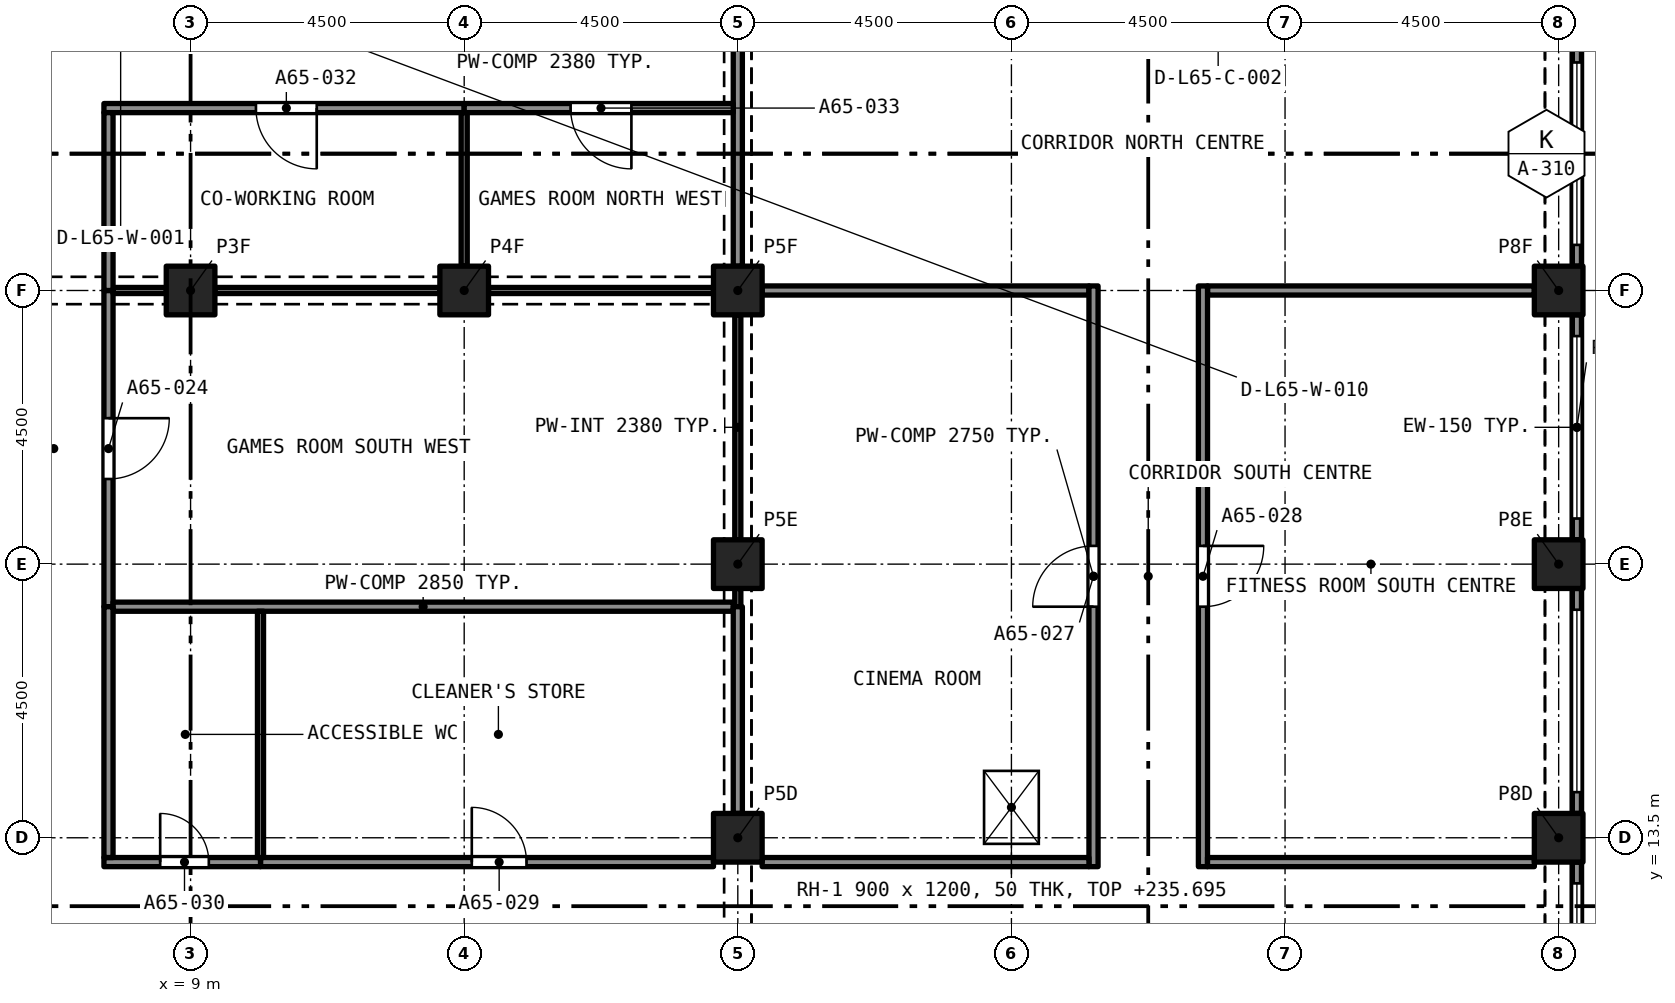
"""IFC4 building model, lengths in metres.
Left out: names, types, materials, properties, quantities, classifications, styles, units other than length and angle.
Written with IfcOpenShell. Run it as: python <this file> out.ifc"""

import sys

from ifc_helpers import new_model, si_unit, direction, frame, frame_2d, origin, origin_2d, place, context, subcontext, project, spatial, rectangle, extrude, element, fill, save


model = new_model("IFC4")
c1 = context("Model", 3, precision=1e-05, world=origin(), true_north=direction((0.0, 1.0)))
c2 = subcontext(c1, "Body", "Model", "MODEL_VIEW")
j1 = project(units=[si_unit("LENGTHUNIT", "METRE"), si_unit("PLANEANGLEUNIT", "RADIAN")], contexts=[c1])
p1 = place(None, origin())
s1 = spatial("IfcSite", under=j1, at=p1, CompositionType="ELEMENT")
p2 = place(p1, origin())
s2 = spatial("IfcBuilding", under=s1, at=p2, CompositionType="ELEMENT")
p3 = place(p2, frame((0.0, 0.0, 232.495)))
s3 = spatial("IfcBuildingStorey", under=s2, at=p3, CompositionType="ELEMENT", Elevation=232.495)
for number, where, z_axis, x_axis in (
    (1, (18.0, 13.5, 0.0), (0.0, 0.0, 1.0), (1.0, 0.0, 0.0)),
    (2, (31.5, 13.5, 0.0), (0.0, 0.0, 1.0), (1.0, 0.0, 0.0)),
    (3, (18.0, 18.0, 0.0), (0.0, 0.0, 1.0), (1.0, 0.0, 0.0)),
    (4, (31.5, 18.0, 0.0), (0.0, 0.0, 1.0), (1.0, 0.0, 0.0)),
    (5, (9.0, 22.5, 0.0), (0.0, 0.0, 1.0), (1.0, 0.0, 0.0)),
    (6, (13.5, 22.5, 0.0), (0.0, 0.0, 1.0), (1.0, 0.0, 0.0)),
    (7, (18.0, 22.5, 0.0), (0.0, 0.0, 1.0), (1.0, 0.0, 0.0)),
    (8, (31.5, 22.5, 0.0), (0.0, 0.0, 1.0), (1.0, 0.0, 0.0)),
):
    element("IfcColumn", number, at=place(p3, frame(where, z_axis=z_axis, x_axis=x_axis)), inside=s3, PredefinedType="COLUMN", context=c2, shape_type="SweptSolid", body=[
        extrude(rectangle(XDim=0.8, YDim=0.8, at=origin_2d()), origin(), (0.0, 0.0, 1.0), 3.2),
    ])
p4 = place(p3, frame((31.8, 13.1, 0.0), z_axis=(0.0, 0.0, 1.0), x_axis=(0.0, -1.0, 0.0)))
e9 = element("IfcWall", 9, at=p4, inside=s3, PredefinedType="SOLIDWALL", context=c2, shape_type="SweptSolid", body=[
    extrude(rectangle(XDim=3.7, YDim=0.15, at=frame_2d((1.85, 0.0))), origin(), (0.0, 0.0, 1.0), 3.2),
])
p5 = place(p4, frame((0.35, 0.0, 0.45)))
e10 = element("IfcOpeningElement", 10, at=p5, cuts=e9, PredefinedType="OPENING", context=c2, shape_type="SweptSolid", body=[
    extrude(rectangle(XDim=3.0, YDim=1.95, at=frame_2d((1.5, 0.975))), frame((0.0, 0.085, 0.0), z_axis=(0.0, -1.0, 0.0), x_axis=(1.0, 0.0, 0.0)), (0.0, 0.0, 1.0), 0.17),
])
p6 = place(p3, frame((31.8, 17.6, 0.0), z_axis=(0.0, 0.0, 1.0), x_axis=(0.0, -1.0, 0.0)))
e11 = element("IfcWall", 11, at=p6, inside=s3, PredefinedType="SOLIDWALL", context=c2, shape_type="SweptSolid", body=[
    extrude(rectangle(XDim=3.7, YDim=0.15, at=frame_2d((1.85, 0.0))), origin(), (0.0, 0.0, 1.0), 3.2),
])
p7 = place(p6, frame((0.35, 0.0, 0.45)))
e12 = element("IfcOpeningElement", 12, at=p7, cuts=e11, PredefinedType="OPENING", context=c2, shape_type="SweptSolid", body=[
    extrude(rectangle(XDim=3.0, YDim=1.95, at=frame_2d((1.5, 0.975))), frame((0.0, 0.085, 0.0), z_axis=(0.0, -1.0, 0.0), x_axis=(1.0, 0.0, 0.0)), (0.0, 0.0, 1.0), 0.17),
])
p8 = place(p3, frame((31.8, 22.1, 0.0), z_axis=(0.0, 0.0, 1.0), x_axis=(0.0, -1.0, 0.0)))
e13 = element("IfcWall", 13, at=p8, inside=s3, PredefinedType="SOLIDWALL", context=c2, shape_type="SweptSolid", body=[
    extrude(rectangle(XDim=3.7, YDim=0.15, at=frame_2d((1.85, 0.0))), origin(), (0.0, 0.0, 1.0), 3.2),
])
p9 = place(p8, frame((0.35, 0.0, 0.45)))
e14 = element("IfcOpeningElement", 14, at=p9, cuts=e13, PredefinedType="OPENING", context=c2, shape_type="SweptSolid", body=[
    extrude(rectangle(XDim=3.0, YDim=1.95, at=frame_2d((1.5, 0.975))), frame((0.0, 0.085, 0.0), z_axis=(0.0, -1.0, 0.0), x_axis=(1.0, 0.0, 0.0)), (0.0, 0.0, 1.0), 0.17),
])
p10 = place(p3, frame((31.8, 26.6, 0.0), z_axis=(0.0, 0.0, 1.0), x_axis=(0.0, -1.0, 0.0)))
e15 = element("IfcWall", 15, at=p10, inside=s3, PredefinedType="SOLIDWALL", context=c2, shape_type="SweptSolid", body=[
    extrude(rectangle(XDim=3.7, YDim=0.15, at=frame_2d((1.85, 0.0))), origin(), (0.0, 0.0, 1.0), 3.2),
])
p11 = place(p10, frame((0.35, 0.0, 0.45)))
e16 = element("IfcOpeningElement", 16, at=p11, cuts=e15, PredefinedType="OPENING", context=c2, shape_type="SweptSolid", body=[
    extrude(rectangle(XDim=3.0, YDim=1.95, at=frame_2d((1.5, 0.975))), frame((0.0, 0.085, 0.0), z_axis=(0.0, -1.0, 0.0), x_axis=(1.0, 0.0, 0.0)), (0.0, 0.0, 1.0), 0.17),
])
for number, where, z_axis, x_axis in (
    (17, (31.8, 13.1, 3.2), (0.0, 0.0, 1.0), (0.0, -1.0, 0.0)),
    (18, (31.8, 17.6, 3.2), (0.0, 0.0, 1.0), (0.0, -1.0, 0.0)),
    (19, (31.8, 22.1, 3.2), (0.0, 0.0, 1.0), (0.0, -1.0, 0.0)),
    (20, (31.8, 26.6, 3.2), (0.0, 0.0, 1.0), (0.0, -1.0, 0.0)),
):
    element("IfcWall", number, at=place(p3, frame(where, z_axis=z_axis, x_axis=x_axis)), inside=s3, PredefinedType="PARAPET", context=c2, shape_type="SweptSolid", body=[
        extrude(rectangle(XDim=3.7, YDim=0.15, at=frame_2d((1.85, 0.0))), origin(), (0.0, 0.0, 1.0), 1.1),
    ])
p12 = place(p3, frame((18.0, 18.4, 0.0), z_axis=(0.0, 0.0, 1.0), x_axis=(0.0, 1.0, 0.0)))
e21 = element("IfcWall", 21, at=p12, inside=s3, PredefinedType="PARTITIONING", context=c2, shape_type="SweptSolid", body=[
    extrude(rectangle(XDim=3.7, YDim=0.1, at=frame_2d((1.85, 0.0))), origin(), (0.0, 0.0, 1.0), 2.38),
])
p13 = place(p3, frame((18.0, 17.3, 0.0), z_axis=(0.0, 0.0, 1.0), x_axis=(0.0, 1.0, 0.0)))
e22 = element("IfcWall", 22, at=p13, inside=s3, PredefinedType="PARTITIONING", context=c2, shape_type="SweptSolid", body=[
    extrude(rectangle(XDim=0.3, YDim=0.1, at=frame_2d((0.15, 0.0))), origin(), (0.0, 0.0, 1.0), 2.75),
])
p14 = place(p3, frame((7.65, 22.5, 0.0), z_axis=(0.0, 0.0, 1.0), x_axis=(0.0, -1.0, 0.0)))
e23 = element("IfcWall", 23, at=p14, inside=s3, PredefinedType="PARTITIONING", context=c2, shape_type="SweptSolid", body=[
    extrude(rectangle(XDim=5.2, YDim=0.15, at=frame_2d((2.6, 0.0))), origin(), (0.0, 0.0, 1.0), 2.85),
])
p15 = place(p14, frame((2.1, 0.0, 0.0)))
e24 = element("IfcOpeningElement", 24, at=p15, cuts=e23, PredefinedType="OPENING", context=c2, shape_type="SweptSolid", body=[
    extrude(rectangle(XDim=1.0, YDim=2.1, at=frame_2d((0.5, 1.05))), frame((0.0, 0.085, 0.0), z_axis=(0.0, -1.0, 0.0), x_axis=(1.0, 0.0, 0.0)), (0.0, 0.0, 1.0), 0.17),
])
p16 = place(p3, frame((7.725, 22.5, 0.0), z_axis=(0.0, 0.0, 1.0), x_axis=(1.0, 0.0, 0.0)))
e25 = element("IfcWall", 25, at=p16, inside=s3, PredefinedType="PARTITIONING", context=c2, shape_type="SweptSolid", body=[
    extrude(rectangle(XDim=0.875, YDim=0.1, at=frame_2d((0.438, 0.0))), origin(), (0.0, 0.0, 1.0), 2.38),
])
for number, where, z_axis, x_axis in (
    (26, (9.4, 22.5, 0.0), (0.0, 0.0, 1.0), (1.0, 0.0, 0.0)),
    (27, (13.9, 22.5, 0.0), (0.0, 0.0, 1.0), (1.0, 0.0, 0.0)),
):
    element("IfcWall", number, at=place(p3, frame(where, z_axis=z_axis, x_axis=x_axis)), inside=s3, PredefinedType="PARTITIONING", context=c2, shape_type="SweptSolid", body=[
        extrude(rectangle(XDim=3.7, YDim=0.1, at=frame_2d((1.85, 0.0))), origin(), (0.0, 0.0, 1.0), 2.38),
    ])
p17 = place(p3, frame((7.725, 17.3, 0.0), z_axis=(0.0, 0.0, 1.0), x_axis=(1.0, 0.0, 0.0)))
e28 = element("IfcWall", 28, at=p17, inside=s3, PredefinedType="PARTITIONING", context=c2, shape_type="SweptSolid", body=[
    extrude(rectangle(XDim=10.2, YDim=0.15, at=frame_2d((5.1, 0.0))), origin(), (0.0, 0.0, 1.0), 2.85),
])
for number, where, z_axis, x_axis in (
    (29, (18.4, 22.5, 0.0), (0.0, 0.0, 1.0), (1.0, 0.0, 0.0)),
    (30, (25.725, 22.5, 0.0), (0.0, 0.0, 1.0), (1.0, 0.0, 0.0)),
):
    element("IfcWall", number, at=place(p3, frame(where, z_axis=z_axis, x_axis=x_axis)), inside=s3, PredefinedType="PARTITIONING", context=c2, shape_type="SweptSolid", body=[
        extrude(rectangle(XDim=5.375, YDim=0.15, at=frame_2d((2.688, 0.0))), origin(), (0.0, 0.0, 1.0), 2.75),
    ])
p18 = place(p3, frame((18.0, 22.9, 0.0), z_axis=(0.0, 0.0, 1.0), x_axis=(0.0, 1.0, 0.0)))
e31 = element("IfcWall", 31, at=p18, inside=s3, PredefinedType="PARTITIONING", context=c2, shape_type="SweptSolid", body=[
    extrude(rectangle(XDim=3.7, YDim=0.15, at=frame_2d((1.85, 0.0))), origin(), (0.0, 0.0, 1.0), 2.38),
])
p19 = place(p3, frame((23.85, 13.025, 0.0), z_axis=(0.0, 0.0, 1.0), x_axis=(0.0, 1.0, 0.0)))
e32 = element("IfcWall", 32, at=p19, inside=s3, PredefinedType="PARTITIONING", context=c2, shape_type="SweptSolid", body=[
    extrude(rectangle(XDim=9.55, YDim=0.15, at=frame_2d((4.775, 0.0))), origin(), (0.0, 0.0, 1.0), 2.75),
])
p20 = place(p19, frame((4.275, 0.0, 0.0)))
e33 = element("IfcOpeningElement", 33, at=p20, cuts=e32, PredefinedType="OPENING", context=c2, shape_type="SweptSolid", body=[
    extrude(rectangle(XDim=1.0, YDim=2.1, at=frame_2d((0.5, 1.05))), frame((0.0, 0.085, 0.0), z_axis=(0.0, -1.0, 0.0), x_axis=(1.0, 0.0, 0.0)), (0.0, 0.0, 1.0), 0.17),
])
p21 = place(p3, frame((25.65, 22.575, 0.0), z_axis=(0.0, 0.0, 1.0), x_axis=(0.0, -1.0, 0.0)))
e34 = element("IfcWall", 34, at=p21, inside=s3, PredefinedType="PARTITIONING", context=c2, shape_type="SweptSolid", body=[
    extrude(rectangle(XDim=9.55, YDim=0.15, at=frame_2d((4.775, 0.0))), origin(), (0.0, 0.0, 1.0), 2.75),
])
p22 = place(p21, frame((4.275, 0.0, 0.0)))
e35 = element("IfcOpeningElement", 35, at=p22, cuts=e34, PredefinedType="OPENING", context=c2, shape_type="SweptSolid", body=[
    extrude(rectangle(XDim=1.0, YDim=2.1, at=frame_2d((0.5, 1.05))), frame((0.0, 0.085, 0.0), z_axis=(0.0, -1.0, 0.0), x_axis=(1.0, 0.0, 0.0)), (0.0, 0.0, 1.0), 0.17),
])
for number, where, z_axis, x_axis in (
    (36, (18.4, 13.1, 0.0), (0.0, 0.0, 1.0), (1.0, 0.0, 0.0)),
    (37, (25.725, 13.1, 0.0), (0.0, 0.0, 1.0), (1.0, 0.0, 0.0)),
):
    element("IfcWall", number, at=place(p3, frame(where, z_axis=z_axis, x_axis=x_axis)), inside=s3, PredefinedType="PARTITIONING", context=c2, shape_type="SweptSolid", body=[
        extrude(rectangle(XDim=5.375, YDim=0.15, at=frame_2d((2.688, 0.0))), origin(), (0.0, 0.0, 1.0), 2.75),
    ])
p23 = place(p3, frame((10.15, 13.1, 0.0), z_axis=(0.0, 0.0, 1.0), x_axis=(1.0, 0.0, 0.0)))
e38 = element("IfcWall", 38, at=p23, inside=s3, PredefinedType="PARTITIONING", context=c2, shape_type="SweptSolid", body=[
    extrude(rectangle(XDim=7.45, YDim=0.15, at=frame_2d((3.725, 0.0))), origin(), (0.0, 0.0, 1.0), 2.85),
])
p24 = place(p23, frame((3.475, 0.0, 0.0)))
e39 = element("IfcOpeningElement", 39, at=p24, cuts=e38, PredefinedType="OPENING", context=c2, shape_type="SweptSolid", body=[
    extrude(rectangle(XDim=0.9, YDim=2.1, at=frame_2d((0.45, 1.05))), frame((0.0, 0.085, 0.0), z_axis=(0.0, -1.0, 0.0), x_axis=(1.0, 0.0, 0.0)), (0.0, 0.0, 1.0), 0.17),
])
p25 = place(p3, frame((7.575, 13.1, 0.0), z_axis=(0.0, 0.0, 1.0), x_axis=(1.0, 0.0, 0.0)))
e40 = element("IfcWall", 40, at=p25, inside=s3, PredefinedType="PARTITIONING", context=c2, shape_type="SweptSolid", body=[
    extrude(rectangle(XDim=2.575, YDim=0.15, at=frame_2d((1.288, 0.0))), origin(), (0.0, 0.0, 1.0), 2.85),
])
p26 = place(p25, frame((0.925, 0.0, 0.0)))
e41 = element("IfcOpeningElement", 41, at=p26, cuts=e40, PredefinedType="OPENING", context=c2, shape_type="SweptSolid", body=[
    extrude(rectangle(XDim=0.8, YDim=2.1, at=frame_2d((0.4, 1.05))), frame((0.0, 0.085, 0.0), z_axis=(0.0, -1.0, 0.0), x_axis=(1.0, 0.0, 0.0)), (0.0, 0.0, 1.0), 0.17),
])
p27 = place(p3, frame((18.0, 13.9, 0.0), z_axis=(0.0, 0.0, 1.0), x_axis=(0.0, 1.0, 0.0)))
e42 = element("IfcWall", 42, at=p27, inside=s3, PredefinedType="PARTITIONING", context=c2, shape_type="SweptSolid", body=[
    extrude(rectangle(XDim=3.4, YDim=0.15, at=frame_2d((1.7, 0.0))), origin(), (0.0, 0.0, 1.0), 2.38),
])
p28 = place(p3, frame((13.5, 25.5, 0.0), z_axis=(0.0, 0.0, 1.0), x_axis=(-1.0, 0.0, 0.0)))
e43 = element("IfcWall", 43, at=p28, inside=s3, PredefinedType="PARTITIONING", context=c2, shape_type="SweptSolid", body=[
    extrude(rectangle(XDim=5.925, YDim=0.15, at=frame_2d((2.962, 0.0))), origin(), (0.0, 0.0, 1.0), 2.85),
])
p29 = place(p28, frame((2.425, 0.0, 0.0)))
e44 = element("IfcOpeningElement", 44, at=p29, cuts=e43, PredefinedType="OPENING", context=c2, shape_type="SweptSolid", body=[
    extrude(rectangle(XDim=1.0, YDim=2.1, at=frame_2d((0.5, 1.05))), frame((0.0, 0.085, 0.0), z_axis=(0.0, -1.0, 0.0), x_axis=(1.0, 0.0, 0.0)), (0.0, 0.0, 1.0), 0.17),
])
p30 = place(p3, frame((7.65, 22.5, 0.0), z_axis=(0.0, 0.0, 1.0), x_axis=(0.0, 1.0, 0.0)))
e45 = element("IfcWall", 45, at=p30, inside=s3, PredefinedType="PARTITIONING", context=c2, shape_type="SweptSolid", body=[
    extrude(rectangle(XDim=2.925, YDim=0.15, at=frame_2d((1.462, 0.0))), origin(), (0.0, 0.0, 1.0), 2.85),
])
p31 = place(p3, frame((17.925, 25.5, 0.0), z_axis=(0.0, 0.0, 1.0), x_axis=(-1.0, 0.0, 0.0)))
e46 = element("IfcWall", 46, at=p31, inside=s3, PredefinedType="PARTITIONING", context=c2, shape_type="SweptSolid", body=[
    extrude(rectangle(XDim=4.425, YDim=0.15, at=frame_2d((2.212, 0.0))), origin(), (0.0, 0.0, 1.0), 2.85),
])
p32 = place(p31, frame((1.675, 0.0, 0.0)))
e47 = element("IfcOpeningElement", 47, at=p32, cuts=e46, PredefinedType="OPENING", context=c2, shape_type="SweptSolid", body=[
    extrude(rectangle(XDim=1.0, YDim=2.1, at=frame_2d((0.5, 1.05))), frame((0.0, 0.085, 0.0), z_axis=(0.0, -1.0, 0.0), x_axis=(1.0, 0.0, 0.0)), (0.0, 0.0, 1.0), 0.17),
])
p33 = place(p3, frame((7.65, 13.175, 0.0), z_axis=(0.0, 0.0, 1.0), x_axis=(0.0, 1.0, 0.0)))
e48 = element("IfcWall", 48, at=p33, inside=s3, PredefinedType="PARTITIONING", context=c2, shape_type="SweptSolid", body=[
    extrude(rectangle(XDim=4.125, YDim=0.15, at=frame_2d((2.062, 0.0))), origin(), (0.0, 0.0, 1.0), 2.85),
])
p34 = place(p3, frame((13.5, 22.9, 0.0), z_axis=(0.0, 0.0, 1.0), x_axis=(0.0, 1.0, 0.0)))
e49 = element("IfcWall", 49, at=p34, inside=s3, PredefinedType="PARTITIONING", context=c2, shape_type="SweptSolid", body=[
    extrude(rectangle(XDim=2.525, YDim=0.1, at=frame_2d((1.263, 0.0))), origin(), (0.0, 0.0, 1.0), 2.85),
])
p35 = place(p3, frame((10.15, 13.175, 0.0), z_axis=(0.0, 0.0, 1.0), x_axis=(0.0, 1.0, 0.0)))
e50 = element("IfcWall", 50, at=p35, inside=s3, PredefinedType="PARTITIONING", context=c2, shape_type="SweptSolid", body=[
    extrude(rectangle(XDim=4.05, YDim=0.1, at=frame_2d((2.025, 0.0))), origin(), (0.0, 0.0, 1.0), 2.85),
])
p36 = place(p5, origin())
e51 = element("IfcWindow", 51, at=p36, inside=s3, PartitioningType="SINGLE_PANEL", PredefinedType="WINDOW", context=c2, shape_type="SweptSolid", body=[
    extrude(rectangle(XDim=3.0, YDim=1.95, at=frame_2d((1.5, 0.975))), frame((0.0, 0.03, 0.0), z_axis=(0.0, -1.0, 0.0), x_axis=(1.0, 0.0, 0.0)), (0.0, 0.0, 1.0), 0.06),
])
fill(e10, e51)
p37 = place(p7, origin())
e52 = element("IfcWindow", 52, at=p37, inside=s3, PartitioningType="SINGLE_PANEL", PredefinedType="WINDOW", context=c2, shape_type="SweptSolid", body=[
    extrude(rectangle(XDim=3.0, YDim=1.95, at=frame_2d((1.5, 0.975))), frame((0.0, 0.03, 0.0), z_axis=(0.0, -1.0, 0.0), x_axis=(1.0, 0.0, 0.0)), (0.0, 0.0, 1.0), 0.06),
])
fill(e12, e52)
p38 = place(p9, origin())
e53 = element("IfcWindow", 53, at=p38, inside=s3, PartitioningType="SINGLE_PANEL", PredefinedType="WINDOW", context=c2, shape_type="SweptSolid", body=[
    extrude(rectangle(XDim=3.0, YDim=1.95, at=frame_2d((1.5, 0.975))), frame((0.0, 0.03, 0.0), z_axis=(0.0, -1.0, 0.0), x_axis=(1.0, 0.0, 0.0)), (0.0, 0.0, 1.0), 0.06),
])
fill(e14, e53)
p39 = place(p11, origin())
e54 = element("IfcWindow", 54, at=p39, inside=s3, PartitioningType="SINGLE_PANEL", PredefinedType="WINDOW", context=c2, shape_type="SweptSolid", body=[
    extrude(rectangle(XDim=3.0, YDim=1.95, at=frame_2d((1.5, 0.975))), frame((0.0, 0.03, 0.0), z_axis=(0.0, -1.0, 0.0), x_axis=(1.0, 0.0, 0.0)), (0.0, 0.0, 1.0), 0.06),
])
fill(e16, e54)
p40 = place(p3, frame((0.0, 0.0, 2.9)))
p41 = place(p40, frame((22.5, 14.0, 0.0)))
p42 = place(p41, frame((0.0, 0.0, 0.25)))
e55 = element("IfcWindow", 55, at=p42, inside=s3, PartitioningType="SINGLE_PANEL", PredefinedType="SKYLIGHT", context=c2, shape_type="SweptSolid", body=[
    extrude(rectangle(XDim=0.9, YDim=1.2, at=origin_2d()), origin(), (0.0, 0.0, 1.0), 0.05),
])
p43 = place(p15, origin())
e56 = element("IfcDoor", 56, at=p43, inside=s3, OperationType="SINGLE_SWING_RIGHT", PredefinedType="DOOR", context=c2, shape_type="SweptSolid", body=[
    extrude(rectangle(XDim=1.0, YDim=2.1, at=frame_2d((0.5, 1.05))), frame((0.0, 0.025, 0.0), z_axis=(0.0, -1.0, 0.0), x_axis=(1.0, 0.0, 0.0)), (0.0, 0.0, 1.0), 0.05),
])
fill(e24, e56)
p44 = place(p20, origin())
e57 = element("IfcDoor", 57, at=p44, inside=s3, OperationType="SINGLE_SWING_RIGHT", PredefinedType="DOOR", context=c2, shape_type="SweptSolid", body=[
    extrude(rectangle(XDim=1.0, YDim=2.1, at=frame_2d((0.5, 1.05))), frame((0.0, 0.025, 0.0), z_axis=(0.0, -1.0, 0.0), x_axis=(1.0, 0.0, 0.0)), (0.0, 0.0, 1.0), 0.05),
])
fill(e33, e57)
p45 = place(p22, origin())
e58 = element("IfcDoor", 58, at=p45, inside=s3, OperationType="SINGLE_SWING_LEFT", PredefinedType="DOOR", context=c2, shape_type="SweptSolid", body=[
    extrude(rectangle(XDim=1.0, YDim=2.1, at=frame_2d((0.5, 1.05))), frame((0.0, 0.025, 0.0), z_axis=(0.0, -1.0, 0.0), x_axis=(1.0, 0.0, 0.0)), (0.0, 0.0, 1.0), 0.05),
])
fill(e35, e58)
p46 = place(p24, origin())
e59 = element("IfcDoor", 59, at=p46, inside=s3, OperationType="SINGLE_SWING_RIGHT", PredefinedType="DOOR", context=c2, shape_type="SweptSolid", body=[
    extrude(rectangle(XDim=0.9, YDim=2.1, at=frame_2d((0.45, 1.05))), frame((0.0, 0.025, 0.0), z_axis=(0.0, -1.0, 0.0), x_axis=(1.0, 0.0, 0.0)), (0.0, 0.0, 1.0), 0.05),
])
fill(e39, e59)
p47 = place(p26, origin())
e60 = element("IfcDoor", 60, at=p47, inside=s3, OperationType="SINGLE_SWING_RIGHT", PredefinedType="DOOR", context=c2, shape_type="SweptSolid", body=[
    extrude(rectangle(XDim=0.8, YDim=2.1, at=frame_2d((0.4, 1.05))), frame((0.0, 0.025, 0.0), z_axis=(0.0, -1.0, 0.0), x_axis=(1.0, 0.0, 0.0)), (0.0, 0.0, 1.0), 0.05),
])
fill(e41, e60)
p48 = place(p29, origin())
e61 = element("IfcDoor", 61, at=p48, inside=s3, OperationType="SINGLE_SWING_LEFT", PredefinedType="DOOR", context=c2, shape_type="SweptSolid", body=[
    extrude(rectangle(XDim=1.0, YDim=2.1, at=frame_2d((0.5, 1.05))), frame((0.0, 0.025, 0.0), z_axis=(0.0, -1.0, 0.0), x_axis=(1.0, 0.0, 0.0)), (0.0, 0.0, 1.0), 0.05),
])
fill(e44, e61)
p49 = place(p32, origin())
e62 = element("IfcDoor", 62, at=p49, inside=s3, OperationType="SINGLE_SWING_LEFT", PredefinedType="DOOR", context=c2, shape_type="SweptSolid", body=[
    extrude(rectangle(XDim=1.0, YDim=2.1, at=frame_2d((0.5, 1.05))), frame((0.0, 0.025, 0.0), z_axis=(0.0, -1.0, 0.0), x_axis=(1.0, 0.0, 0.0)), (0.0, 0.0, 1.0), 0.05),
])
fill(e47, e62)
save(model, sys.argv[1])
